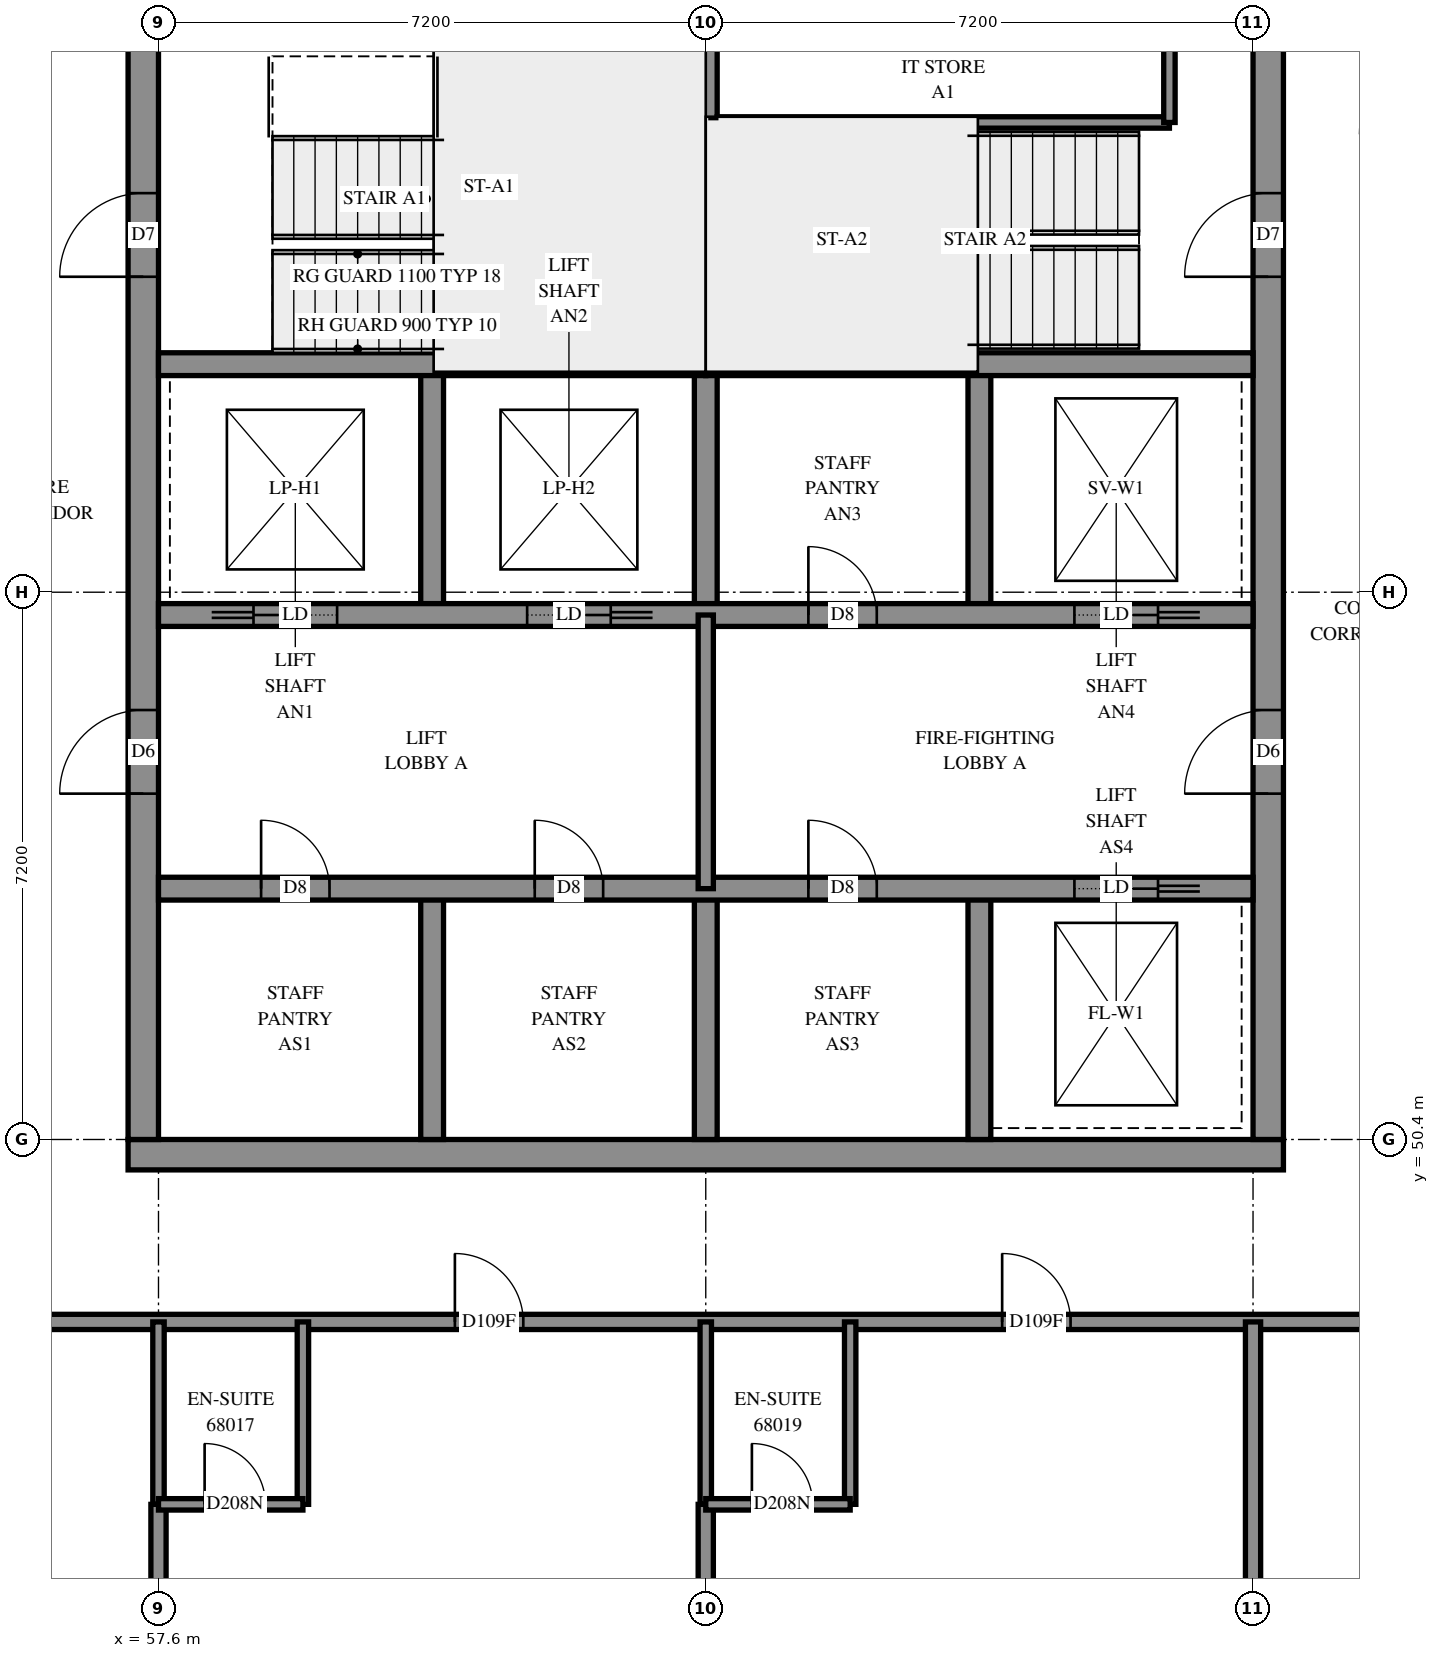
"""IFC4 building model, lengths in metres.
Left out: names, types, materials, properties, quantities, classifications, styles, units other than length and angle.
Written with IfcOpenShell. Run it as: python <this file> out.ifc"""

import sys

from ifc_helpers import new_model, si_unit, direction, frame, frame_2d, origin, place, context, subcontext, project, spatial, rectangle, extrude, element, fill, save


model = new_model("IFC4")
c1 = context("Model", 3, precision=1e-05, world=origin(), true_north=direction((0.0, 1.0)))
c2 = subcontext(c1, "Body", "Model", "MODEL_VIEW")
j1 = project(units=[si_unit("LENGTHUNIT", "METRE"), si_unit("PLANEANGLEUNIT", "RADIAN")], contexts=[c1])
p1 = place(None, origin())
s1 = spatial("IfcSite", under=j1, at=p1, CompositionType="ELEMENT")
p2 = place(p1, origin())
s2 = spatial("IfcBuilding", under=s1, at=p2, CompositionType="ELEMENT")
p3 = place(p2, frame((0.0, 0.0, 250.6)))
s3 = spatial("IfcBuildingStorey", under=s2, at=p3, CompositionType="ELEMENT", Elevation=250.6)
p4 = place(p3, frame((57.2, 50.2, -0.3), z_axis=(0.0, 0.0, 1.0), x_axis=(1.0, 0.0, 0.0)))
e1 = element("IfcWall", 1, at=p4, inside=s3, PredefinedType="SHEAR", context=c2, shape_type="SweptSolid", body=[
    extrude(rectangle(XDim=15.2, YDim=0.4, at=frame_2d((7.6, 0.0))), origin(), (0.0, 0.0, 1.0), 2.7),
])
p5 = place(p3, frame((57.4, 50.4, -0.3), z_axis=(0.0, 0.0, 1.0), x_axis=(0.0, 1.0, 0.0)))
e2 = element("IfcWall", 2, at=p5, inside=s3, PredefinedType="SHEAR", context=c2, shape_type="SweptSolid", body=[
    extrude(rectangle(XDim=14.4, YDim=0.4, at=frame_2d((7.2, 0.0))), origin(), (0.0, 0.0, 1.0), 2.7),
])
p6 = place(p5, frame((4.55, 0.0, 0.3)))
e3 = element("IfcOpeningElement", 3, at=p6, cuts=e2, PredefinedType="OPENING", context=c2, shape_type="SweptSolid", body=[
    extrude(rectangle(XDim=1.1, YDim=2.1, at=frame_2d((0.55, 1.05))), frame((0.0, 0.21, 0.0), z_axis=(0.0, -1.0, 0.0), x_axis=(1.0, 0.0, 0.0)), (0.0, 0.0, 1.0), 0.42),
])
p7 = place(p5, frame((11.35, 0.0, 0.3)))
e4 = element("IfcOpeningElement", 4, at=p7, cuts=e2, PredefinedType="OPENING", context=c2, shape_type="SweptSolid", body=[
    extrude(rectangle(XDim=1.1, YDim=2.1, at=frame_2d((0.55, 1.05))), frame((0.0, 0.21, 0.0), z_axis=(0.0, -1.0, 0.0), x_axis=(1.0, 0.0, 0.0)), (0.0, 0.0, 1.0), 0.42),
])
p8 = place(p3, frame((72.2, 50.4, -0.3), z_axis=(0.0, 0.0, 1.0), x_axis=(0.0, 1.0, 0.0)))
e5 = element("IfcWall", 5, at=p8, inside=s3, PredefinedType="SHEAR", context=c2, shape_type="SweptSolid", body=[
    extrude(rectangle(XDim=14.4, YDim=0.4, at=frame_2d((7.2, 0.0))), origin(), (0.0, 0.0, 1.0), 2.7),
])
p9 = place(p8, frame((4.55, 0.0, 0.3)))
e6 = element("IfcOpeningElement", 6, at=p9, cuts=e5, PredefinedType="OPENING", context=c2, shape_type="SweptSolid", body=[
    extrude(rectangle(XDim=1.1, YDim=2.1, at=frame_2d((0.55, 1.05))), frame((0.0, 0.21, 0.0), z_axis=(0.0, -1.0, 0.0), x_axis=(1.0, 0.0, 0.0)), (0.0, 0.0, 1.0), 0.42),
])
p10 = place(p8, frame((11.35, 0.0, 0.3)))
e7 = element("IfcOpeningElement", 7, at=p10, cuts=e5, PredefinedType="OPENING", context=c2, shape_type="SweptSolid", body=[
    extrude(rectangle(XDim=1.1, YDim=2.1, at=frame_2d((0.55, 1.05))), frame((0.0, 0.21, 0.0), z_axis=(0.0, -1.0, 0.0), x_axis=(1.0, 0.0, 0.0)), (0.0, 0.0, 1.0), 0.42),
])
for number, where, z_axis, x_axis in (
    (8, (61.2, 50.4, 0.0), (0.0, 0.0, 1.0), (0.0, 1.0, 0.0)),
    (9, (61.2, 57.3, 0.0), (0.0, 0.0, 1.0), (0.0, 1.0, 0.0)),
    (10, (64.8, 50.4, 0.0), (0.0, 0.0, 1.0), (0.0, 1.0, 0.0)),
    (11, (64.8, 57.3, 0.0), (0.0, 0.0, 1.0), (0.0, 1.0, 0.0)),
    (12, (68.4, 50.4, 0.0), (0.0, 0.0, 1.0), (0.0, 1.0, 0.0)),
    (13, (68.4, 57.3, 0.0), (0.0, 0.0, 1.0), (0.0, 1.0, 0.0)),
):
    element("IfcWall", number, at=place(p3, frame(where, z_axis=z_axis, x_axis=x_axis)), inside=s3, PredefinedType="SOLIDWALL", context=c2, shape_type="SweptSolid", body=[
        extrude(rectangle(XDim=3.3, YDim=0.3, at=frame_2d((1.65, 0.0))), origin(), (0.0, 0.0, 1.0), 3.1),
    ])
p11 = place(p3, frame((57.6, 53.7, 0.0), z_axis=(0.0, 0.0, 1.0), x_axis=(1.0, 0.0, 0.0)))
e14 = element("IfcWall", 14, at=p11, inside=s3, PredefinedType="SOLIDWALL", context=c2, shape_type="SweptSolid", body=[
    extrude(rectangle(XDim=14.4, YDim=0.3, at=frame_2d((7.2, 0.0))), origin(), (0.0, 0.0, 1.0), 3.1),
])
p12 = place(p11, frame((1.35, 0.0, 0.0)))
e15 = element("IfcOpeningElement", 15, at=p12, cuts=e14, PredefinedType="OPENING", context=c2, shape_type="SweptSolid", body=[
    extrude(rectangle(XDim=0.9, YDim=2.1, at=frame_2d((0.45, 1.05))), frame((0.0, 0.16, 0.0), z_axis=(0.0, -1.0, 0.0), x_axis=(1.0, 0.0, 0.0)), (0.0, 0.0, 1.0), 0.32),
])
p13 = place(p11, frame((4.95, 0.0, 0.0)))
e16 = element("IfcOpeningElement", 16, at=p13, cuts=e14, PredefinedType="OPENING", context=c2, shape_type="SweptSolid", body=[
    extrude(rectangle(XDim=0.9, YDim=2.1, at=frame_2d((0.45, 1.05))), frame((0.0, 0.16, 0.0), z_axis=(0.0, -1.0, 0.0), x_axis=(1.0, 0.0, 0.0)), (0.0, 0.0, 1.0), 0.32),
])
p14 = place(p11, frame((8.55, 0.0, 0.0)))
e17 = element("IfcOpeningElement", 17, at=p14, cuts=e14, PredefinedType="OPENING", context=c2, shape_type="SweptSolid", body=[
    extrude(rectangle(XDim=0.9, YDim=2.1, at=frame_2d((0.45, 1.05))), frame((0.0, 0.16, 0.0), z_axis=(0.0, -1.0, 0.0), x_axis=(1.0, 0.0, 0.0)), (0.0, 0.0, 1.0), 0.32),
])
p15 = place(p11, frame((12.05, 0.0, 0.0)))
e18 = element("IfcOpeningElement", 18, at=p15, cuts=e14, PredefinedType="OPENING", context=c2, shape_type="SweptSolid", body=[
    extrude(rectangle(XDim=1.1, YDim=2.1, at=frame_2d((0.55, 1.05))), frame((0.0, 0.16, 0.0), z_axis=(0.0, -1.0, 0.0), x_axis=(1.0, 0.0, 0.0)), (0.0, 0.0, 1.0), 0.32),
])
p16 = place(p3, frame((57.6, 57.3, 0.0), z_axis=(0.0, 0.0, 1.0), x_axis=(1.0, 0.0, 0.0)))
e19 = element("IfcWall", 19, at=p16, inside=s3, PredefinedType="SOLIDWALL", context=c2, shape_type="SweptSolid", body=[
    extrude(rectangle(XDim=14.4, YDim=0.3, at=frame_2d((7.2, 0.0))), origin(), (0.0, 0.0, 1.0), 3.1),
])
p17 = place(p16, frame((8.55, 0.0, 0.0)))
e20 = element("IfcOpeningElement", 20, at=p17, cuts=e19, PredefinedType="OPENING", context=c2, shape_type="SweptSolid", body=[
    extrude(rectangle(XDim=0.9, YDim=2.1, at=frame_2d((0.45, 1.05))), frame((0.0, 0.16, 0.0), z_axis=(0.0, -1.0, 0.0), x_axis=(1.0, 0.0, 0.0)), (0.0, 0.0, 1.0), 0.32),
])
p18 = place(p16, frame((1.25, 0.0, 0.0)))
e21 = element("IfcOpeningElement", 21, at=p18, cuts=e19, PredefinedType="OPENING", context=c2, shape_type="SweptSolid", body=[
    extrude(rectangle(XDim=1.1, YDim=2.1, at=frame_2d((0.55, 1.05))), frame((0.0, 0.16, 0.0), z_axis=(0.0, -1.0, 0.0), x_axis=(1.0, 0.0, 0.0)), (0.0, 0.0, 1.0), 0.32),
])
p19 = place(p16, frame((4.85, 0.0, 0.0)))
e22 = element("IfcOpeningElement", 22, at=p19, cuts=e19, PredefinedType="OPENING", context=c2, shape_type="SweptSolid", body=[
    extrude(rectangle(XDim=1.1, YDim=2.1, at=frame_2d((0.55, 1.05))), frame((0.0, 0.16, 0.0), z_axis=(0.0, -1.0, 0.0), x_axis=(1.0, 0.0, 0.0)), (0.0, 0.0, 1.0), 0.32),
])
p20 = place(p16, frame((12.05, 0.0, 0.0)))
e23 = element("IfcOpeningElement", 23, at=p20, cuts=e19, PredefinedType="OPENING", context=c2, shape_type="SweptSolid", body=[
    extrude(rectangle(XDim=1.1, YDim=2.1, at=frame_2d((0.55, 1.05))), frame((0.0, 0.16, 0.0), z_axis=(0.0, -1.0, 0.0), x_axis=(1.0, 0.0, 0.0)), (0.0, 0.0, 1.0), 0.32),
])
for number, where, z_axis, x_axis in (
    (24, (57.6, 60.6, 0.0), (0.0, 0.0, 1.0), (1.0, 0.0, 0.0)),
    (25, (64.8, 60.6, 0.0), (0.0, 0.0, 1.0), (1.0, 0.0, 0.0)),
):
    element("IfcWall", number, at=place(p3, frame(where, z_axis=z_axis, x_axis=x_axis)), inside=s3, PredefinedType="SOLIDWALL", context=c2, shape_type="SweptSolid", body=[
        extrude(rectangle(XDim=7.2, YDim=0.3, at=frame_2d((3.6, 0.0))), origin(), (0.0, 0.0, 1.0), 3.1),
    ])
p21 = place(p3, frame((64.8, 60.6, 0.0), z_axis=(0.0, 0.0, 1.0), x_axis=(0.0, 1.0, 0.0)))
e26 = element("IfcWall", 26, at=p21, inside=s3, PredefinedType="SOLIDWALL", context=c2, shape_type="SweptSolid", body=[
    extrude(rectangle(XDim=4.2, YDim=0.3, at=frame_2d((2.1, 0.0))), origin(), (0.0, 0.0, 1.0), 3.1),
])
p22 = place(p3, frame((64.95, 63.78, 0.0), z_axis=(0.0, 0.0, 1.0), x_axis=(1.0, 0.0, 0.0)))
e27 = element("IfcWall", 27, at=p22, inside=s3, PredefinedType="PARTITIONING", context=c2, shape_type="SweptSolid", body=[
    extrude(rectangle(XDim=5.95, YDim=0.15, at=frame_2d((2.975, 0.0))), origin(), (0.0, 0.0, 1.0), 3.1),
])
p23 = place(p3, frame((70.9, 63.78, 0.0), z_axis=(0.0, 0.0, 1.0), x_axis=(0.0, 1.0, 0.0)))
e28 = element("IfcWall", 28, at=p23, inside=s3, PredefinedType="PARTITIONING", context=c2, shape_type="SweptSolid", body=[
    extrude(rectangle(XDim=1.02, YDim=0.15, at=frame_2d((0.51, 0.0))), origin(), (0.0, 0.0, 1.0), 3.1),
])
p24 = place(p3, frame((64.8, 53.7, 0.0), z_axis=(0.0, 0.0, 1.0), x_axis=(0.0, 1.0, 0.0)))
e29 = element("IfcWall", 29, at=p24, inside=s3, PredefinedType="PARTITIONING", context=c2, shape_type="SweptSolid", body=[
    extrude(rectangle(XDim=3.6, YDim=0.2, at=frame_2d((1.8, 0.0))), origin(), (0.0, 0.0, 1.0), 3.1),
])
p25 = place(p3, frame((55.2, 48.0, 0.0), z_axis=(0.0, 0.0, 1.0), x_axis=(1.0, 0.0, 0.0)))
e30 = element("IfcWall", 30, at=p25, inside=s3, PredefinedType="PARTITIONING", context=c2, shape_type="SweptSolid", body=[
    extrude(rectangle(XDim=19.15, YDim=0.2, at=frame_2d((9.575, 0.0))), origin(), (0.0, 0.0, 1.0), 3.1),
])
p26 = place(p25, frame((6.299, 0.0, 0.0)))
e31 = element("IfcOpeningElement", 31, at=p26, cuts=e30, PredefinedType="OPENING", context=c2, shape_type="SweptSolid", body=[
    extrude(rectangle(XDim=0.9, YDim=2.1, at=frame_2d((0.45, 1.05))), frame((0.0, 0.11, 0.0), z_axis=(0.0, -1.0, 0.0), x_axis=(1.0, 0.0, 0.0)), (0.0, 0.0, 1.0), 0.22),
])
p27 = place(p25, frame((13.499, 0.0, 0.0)))
e32 = element("IfcOpeningElement", 32, at=p27, cuts=e30, PredefinedType="OPENING", context=c2, shape_type="SweptSolid", body=[
    extrude(rectangle(XDim=0.9, YDim=2.1, at=frame_2d((0.45, 1.05))), frame((0.0, 0.11, 0.0), z_axis=(0.0, -1.0, 0.0), x_axis=(1.0, 0.0, 0.0)), (0.0, 0.0, 1.0), 0.22),
])
p28 = place(p3, frame((72.0, 43.55, 0.0), z_axis=(0.0, 0.0, 1.0), x_axis=(0.0, 1.0, 0.0)))
e33 = element("IfcWall", 33, at=p28, inside=s3, PredefinedType="PARTITIONING", context=c2, shape_type="SweptSolid", body=[
    extrude(rectangle(XDim=4.45, YDim=0.2, at=frame_2d((2.225, 0.0))), origin(), (0.0, 0.0, 1.0), 3.1),
])
for number, where, z_axis, x_axis in (
    (34, (59.5, 45.6, 0.0), (0.0, 0.0, 1.0), (0.0, 1.0, 0.0)),
    (35, (57.6, 45.6, 0.0), (0.0, 0.0, 1.0), (0.0, 1.0, 0.0)),
    (36, (66.7, 45.6, 0.0), (0.0, 0.0, 1.0), (0.0, 1.0, 0.0)),
    (37, (64.8, 45.6, 0.0), (0.0, 0.0, 1.0), (0.0, 1.0, 0.0)),
):
    element("IfcWall", number, at=place(p3, frame(where, z_axis=z_axis, x_axis=x_axis)), inside=s3, PredefinedType="PARTITIONING", context=c2, shape_type="SweptSolid", body=[
        extrude(rectangle(XDim=2.4, YDim=0.15, at=frame_2d((1.2, 0.0))), origin(), (0.0, 0.0, 1.0), 3.1),
    ])
for number, where, z_axis, x_axis in (
    (38, (57.6, 43.55, 0.0), (0.0, 0.0, 1.0), (0.0, 1.0, 0.0)),
    (39, (64.8, 43.55, 0.0), (0.0, 0.0, 1.0), (0.0, 1.0, 0.0)),
):
    element("IfcWall", number, at=place(p3, frame(where, z_axis=z_axis, x_axis=x_axis)), inside=s3, PredefinedType="PARTITIONING", context=c2, shape_type="SweptSolid", body=[
        extrude(rectangle(XDim=2.05, YDim=0.2, at=frame_2d((1.025, 0.0))), origin(), (0.0, 0.0, 1.0), 3.1),
    ])
p29 = place(p3, frame((64.8, 45.6, 0.0), z_axis=(0.0, 0.0, 1.0), x_axis=(1.0, 0.0, 0.0)))
e40 = element("IfcWall", 40, at=p29, inside=s3, PredefinedType="PARTITIONING", context=c2, shape_type="SweptSolid", body=[
    extrude(rectangle(XDim=1.9, YDim=0.15, at=frame_2d((0.95, 0.0))), origin(), (0.0, 0.0, 1.0), 3.1),
])
p30 = place(p29, frame((0.607, 0.0, 0.0)))
e41 = element("IfcOpeningElement", 41, at=p30, cuts=e40, PredefinedType="OPENING", context=c2, shape_type="SweptSolid", body=[
    extrude(rectangle(XDim=0.8, YDim=2.1, at=frame_2d((0.4, 1.05))), frame((0.0, 0.085, 0.0), z_axis=(0.0, -1.0, 0.0), x_axis=(1.0, 0.0, 0.0)), (0.0, 0.0, 1.0), 0.17),
])
p31 = place(p3, frame((57.6, 45.6, 0.0), z_axis=(0.0, 0.0, 1.0), x_axis=(1.0, 0.0, 0.0)))
e42 = element("IfcWall", 42, at=p31, inside=s3, PredefinedType="PARTITIONING", context=c2, shape_type="SweptSolid", body=[
    extrude(rectangle(XDim=1.9, YDim=0.15, at=frame_2d((0.95, 0.0))), origin(), (0.0, 0.0, 1.0), 3.1),
])
p32 = place(p31, frame((0.607, 0.0, 0.0)))
e43 = element("IfcOpeningElement", 43, at=p32, cuts=e42, PredefinedType="OPENING", context=c2, shape_type="SweptSolid", body=[
    extrude(rectangle(XDim=0.8, YDim=2.1, at=frame_2d((0.4, 1.05))), frame((0.0, 0.085, 0.0), z_axis=(0.0, -1.0, 0.0), x_axis=(1.0, 0.0, 0.0)), (0.0, 0.0, 1.0), 0.17),
])
p33 = place(p6, origin())
e44 = element("IfcDoor", 44, at=p33, inside=s3, OperationType="DOUBLE_DOOR_SINGLE_SWING", PredefinedType="DOOR", context=c2, shape_type="SweptSolid", body=[
    extrude(rectangle(XDim=1.1, YDim=2.1, at=frame_2d((0.55, 1.05))), frame((0.0, 0.025, 0.0), z_axis=(0.0, -1.0, 0.0), x_axis=(1.0, 0.0, 0.0)), (0.0, 0.0, 1.0), 0.05),
])
fill(e3, e44)
p34 = place(p9, origin())
e45 = element("IfcDoor", 45, at=p34, inside=s3, OperationType="DOUBLE_DOOR_SINGLE_SWING", PredefinedType="DOOR", context=c2, shape_type="SweptSolid", body=[
    extrude(rectangle(XDim=1.1, YDim=2.1, at=frame_2d((0.55, 1.05))), frame((0.0, 0.025, 0.0), z_axis=(0.0, -1.0, 0.0), x_axis=(1.0, 0.0, 0.0)), (0.0, 0.0, 1.0), 0.05),
])
fill(e6, e45)
p35 = place(p7, origin())
e46 = element("IfcDoor", 46, at=p35, inside=s3, OperationType="SINGLE_SWING_LEFT", PredefinedType="DOOR", context=c2, shape_type="SweptSolid", body=[
    extrude(rectangle(XDim=1.1, YDim=2.1, at=frame_2d((0.55, 1.05))), frame((0.0, 0.025, 0.0), z_axis=(0.0, -1.0, 0.0), x_axis=(1.0, 0.0, 0.0)), (0.0, 0.0, 1.0), 0.05),
])
fill(e4, e46)
p36 = place(p10, origin())
e47 = element("IfcDoor", 47, at=p36, inside=s3, OperationType="SINGLE_SWING_RIGHT", PredefinedType="DOOR", context=c2, shape_type="SweptSolid", body=[
    extrude(rectangle(XDim=1.1, YDim=2.1, at=frame_2d((0.55, 1.05))), frame((0.0, 0.025, 0.0), z_axis=(0.0, -1.0, 0.0), x_axis=(1.0, 0.0, 0.0)), (0.0, 0.0, 1.0), 0.05),
])
fill(e7, e47)
p37 = place(p12, origin())
e48 = element("IfcDoor", 48, at=p37, inside=s3, OperationType="SINGLE_SWING_LEFT", PredefinedType="DOOR", context=c2, shape_type="SweptSolid", body=[
    extrude(rectangle(XDim=0.9, YDim=2.1, at=frame_2d((0.45, 1.05))), frame((0.0, 0.025, 0.0), z_axis=(0.0, -1.0, 0.0), x_axis=(1.0, 0.0, 0.0)), (0.0, 0.0, 1.0), 0.05),
])
fill(e15, e48)
p38 = place(p13, origin())
e49 = element("IfcDoor", 49, at=p38, inside=s3, OperationType="SINGLE_SWING_LEFT", PredefinedType="DOOR", context=c2, shape_type="SweptSolid", body=[
    extrude(rectangle(XDim=0.9, YDim=2.1, at=frame_2d((0.45, 1.05))), frame((0.0, 0.025, 0.0), z_axis=(0.0, -1.0, 0.0), x_axis=(1.0, 0.0, 0.0)), (0.0, 0.0, 1.0), 0.05),
])
fill(e16, e49)
p39 = place(p14, origin())
e50 = element("IfcDoor", 50, at=p39, inside=s3, OperationType="SINGLE_SWING_LEFT", PredefinedType="DOOR", context=c2, shape_type="SweptSolid", body=[
    extrude(rectangle(XDim=0.9, YDim=2.1, at=frame_2d((0.45, 1.05))), frame((0.0, 0.025, 0.0), z_axis=(0.0, -1.0, 0.0), x_axis=(1.0, 0.0, 0.0)), (0.0, 0.0, 1.0), 0.05),
])
fill(e17, e50)
p40 = place(p17, origin())
e51 = element("IfcDoor", 51, at=p40, inside=s3, OperationType="SINGLE_SWING_LEFT", PredefinedType="DOOR", context=c2, shape_type="SweptSolid", body=[
    extrude(rectangle(XDim=0.9, YDim=2.1, at=frame_2d((0.45, 1.05))), frame((0.0, 0.025, 0.0), z_axis=(0.0, -1.0, 0.0), x_axis=(1.0, 0.0, 0.0)), (0.0, 0.0, 1.0), 0.05),
])
fill(e20, e51)
p41 = place(p15, origin())
e52 = element("IfcDoor", 52, at=p41, inside=s3, OperationType="SLIDING_TO_RIGHT", PredefinedType="DOOR", context=c2, shape_type="SweptSolid", body=[
    extrude(rectangle(XDim=1.1, YDim=2.1, at=frame_2d((0.55, 1.05))), frame((0.0, 0.025, 0.0), z_axis=(0.0, -1.0, 0.0), x_axis=(1.0, 0.0, 0.0)), (0.0, 0.0, 1.0), 0.05),
])
fill(e18, e52)
p42 = place(p18, origin())
e53 = element("IfcDoor", 53, at=p42, inside=s3, OperationType="SLIDING_TO_LEFT", PredefinedType="DOOR", context=c2, shape_type="SweptSolid", body=[
    extrude(rectangle(XDim=1.1, YDim=2.1, at=frame_2d((0.55, 1.05))), frame((0.0, 0.025, 0.0), z_axis=(0.0, -1.0, 0.0), x_axis=(1.0, 0.0, 0.0)), (0.0, 0.0, 1.0), 0.05),
])
fill(e21, e53)
p43 = place(p19, origin())
e54 = element("IfcDoor", 54, at=p43, inside=s3, OperationType="SLIDING_TO_RIGHT", PredefinedType="DOOR", context=c2, shape_type="SweptSolid", body=[
    extrude(rectangle(XDim=1.1, YDim=2.1, at=frame_2d((0.55, 1.05))), frame((0.0, 0.025, 0.0), z_axis=(0.0, -1.0, 0.0), x_axis=(1.0, 0.0, 0.0)), (0.0, 0.0, 1.0), 0.05),
])
fill(e22, e54)
p44 = place(p20, origin())
e55 = element("IfcDoor", 55, at=p44, inside=s3, OperationType="SLIDING_TO_RIGHT", PredefinedType="DOOR", context=c2, shape_type="SweptSolid", body=[
    extrude(rectangle(XDim=1.1, YDim=2.1, at=frame_2d((0.55, 1.05))), frame((0.0, 0.025, 0.0), z_axis=(0.0, -1.0, 0.0), x_axis=(1.0, 0.0, 0.0)), (0.0, 0.0, 1.0), 0.05),
])
fill(e23, e55)
p45 = place(p26, origin())
e56 = element("IfcDoor", 56, at=p45, inside=s3, OperationType="SINGLE_SWING_LEFT", PredefinedType="DOOR", context=c2, shape_type="SweptSolid", body=[
    extrude(rectangle(XDim=0.9, YDim=2.1, at=frame_2d((0.45, 1.05))), frame((0.0, 0.025, 0.0), z_axis=(0.0, -1.0, 0.0), x_axis=(1.0, 0.0, 0.0)), (0.0, 0.0, 1.0), 0.05),
])
fill(e31, e56)
p46 = place(p32, origin())
e57 = element("IfcDoor", 57, at=p46, inside=s3, OperationType="SINGLE_SWING_RIGHT", PredefinedType="DOOR", context=c2, shape_type="SweptSolid", body=[
    extrude(rectangle(XDim=0.8, YDim=2.1, at=frame_2d((0.4, 1.05))), frame((0.0, 0.025, 0.0), z_axis=(0.0, -1.0, 0.0), x_axis=(1.0, 0.0, 0.0)), (0.0, 0.0, 1.0), 0.05),
])
fill(e43, e57)
p47 = place(p27, origin())
e58 = element("IfcDoor", 58, at=p47, inside=s3, OperationType="SINGLE_SWING_LEFT", PredefinedType="DOOR", context=c2, shape_type="SweptSolid", body=[
    extrude(rectangle(XDim=0.9, YDim=2.1, at=frame_2d((0.45, 1.05))), frame((0.0, 0.025, 0.0), z_axis=(0.0, -1.0, 0.0), x_axis=(1.0, 0.0, 0.0)), (0.0, 0.0, 1.0), 0.05),
])
fill(e32, e58)
p48 = place(p30, origin())
e59 = element("IfcDoor", 59, at=p48, inside=s3, OperationType="SINGLE_SWING_RIGHT", PredefinedType="DOOR", context=c2, shape_type="SweptSolid", body=[
    extrude(rectangle(XDim=0.8, YDim=2.1, at=frame_2d((0.4, 1.05))), frame((0.0, 0.025, 0.0), z_axis=(0.0, -1.0, 0.0), x_axis=(1.0, 0.0, 0.0)), (0.0, 0.0, 1.0), 0.05),
])
fill(e41, e59)
save(model, sys.argv[1])
